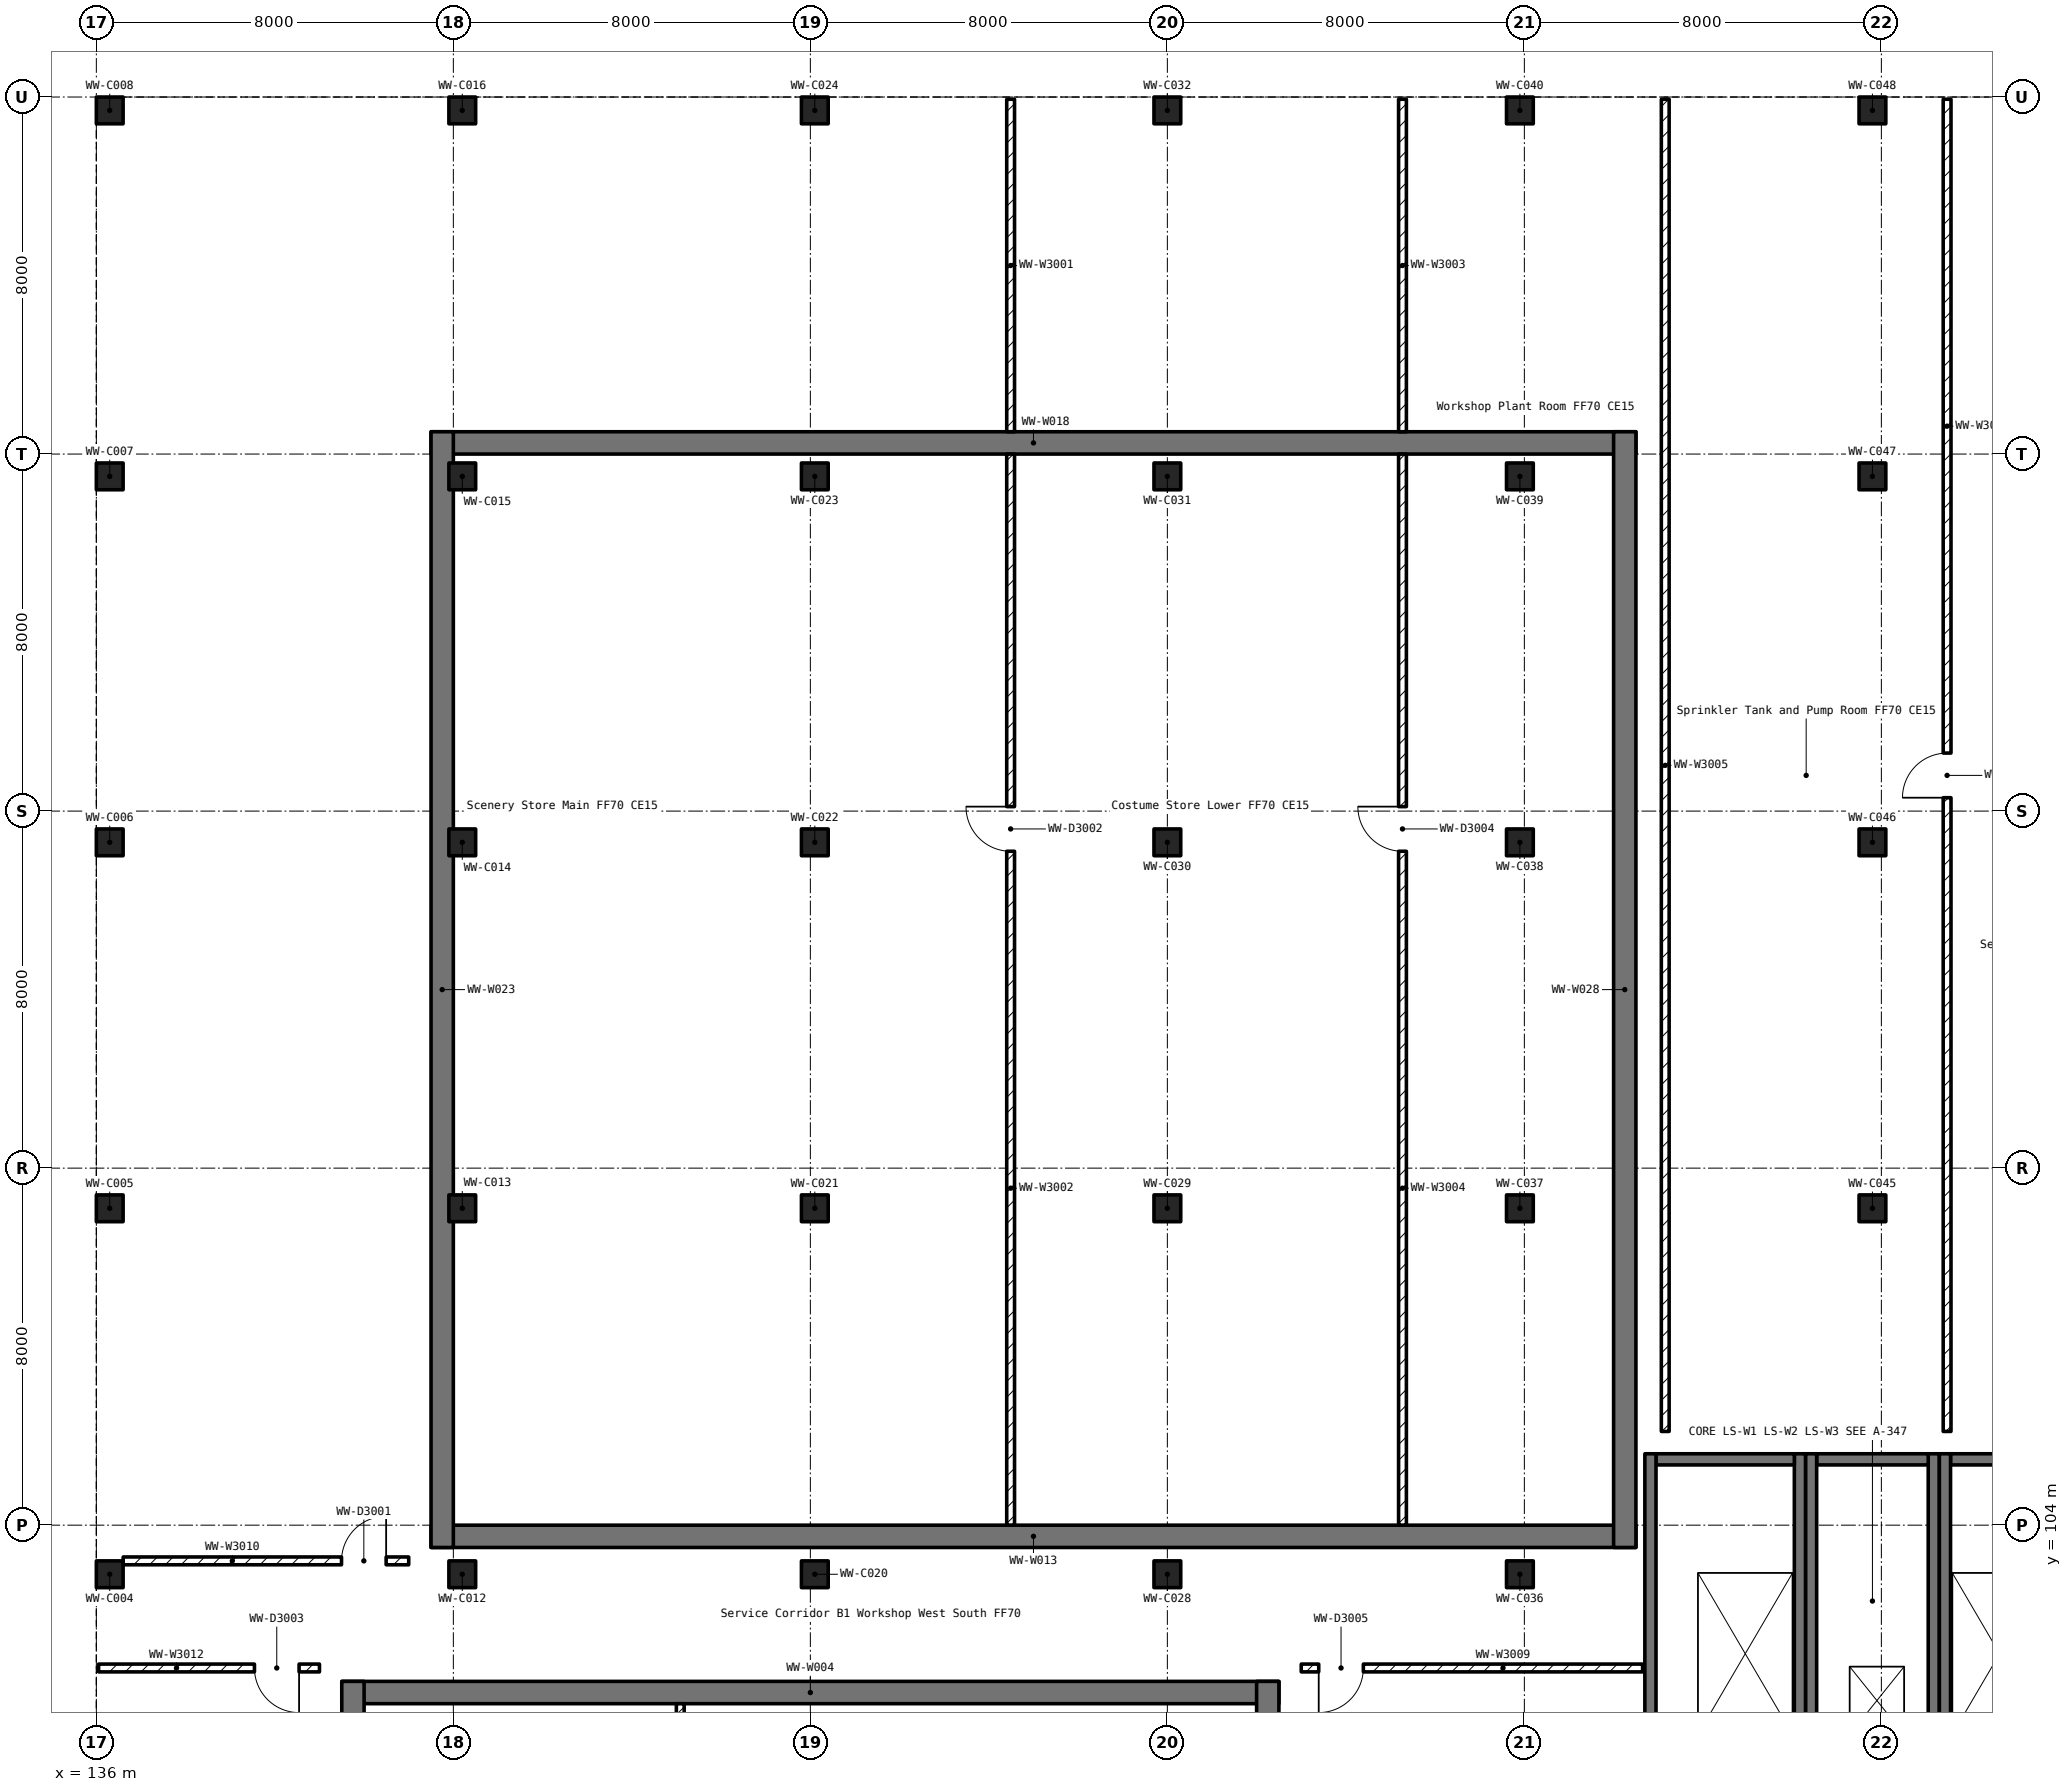
"""IFC4 building model, lengths in metres.
Left out: names, types, materials, properties, quantities, classifications, styles, units other than length and angle.
Written with IfcOpenShell. Run it as: python <this file> out.ifc"""

import sys

from ifc_helpers import new_model, si_unit, direction, frame, frame_2d, origin, origin_2d, place, context, subcontext, project, spatial, rectangle, extrude, element, fill, save


model = new_model("IFC4")
c1 = context("Model", 3, precision=1e-05, world=origin(), true_north=direction((0.0, 1.0)))
c2 = subcontext(c1, "Body", "Model", "MODEL_VIEW")
j1 = project(units=[si_unit("LENGTHUNIT", "METRE"), si_unit("PLANEANGLEUNIT", "RADIAN")], contexts=[c1])
p1 = place(None, origin())
s1 = spatial("IfcSite", under=j1, at=p1, CompositionType="ELEMENT")
p2 = place(p1, origin())
s2 = spatial("IfcBuilding", under=s1, at=p2, CompositionType="ELEMENT")
p3 = place(p2, frame((0.0, 0.0, -6.0)))
s3 = spatial("IfcBuildingStorey", under=s2, at=p3, CompositionType="ELEMENT", Elevation=-6.0)
for number, where, z_axis, x_axis in (
    (1, (136.3, 102.9, 0.0), (0.0, 0.0, 1.0), (1.0, 0.0, 0.0)),
    (2, (136.3, 111.1, 0.0), (0.0, 0.0, 1.0), (1.0, 0.0, 0.0)),
    (3, (136.3, 119.3, 0.0), (0.0, 0.0, 1.0), (1.0, 0.0, 0.0)),
    (4, (136.3, 127.5, 0.0), (0.0, 0.0, 1.0), (1.0, 0.0, 0.0)),
    (5, (136.3, 135.7, 0.0), (0.0, 0.0, 1.0), (1.0, 0.0, 0.0)),
    (6, (144.2, 102.9, 0.0), (0.0, 0.0, 1.0), (1.0, 0.0, 0.0)),
    (7, (144.2, 111.1, 0.0), (0.0, 0.0, 1.0), (1.0, 0.0, 0.0)),
    (8, (144.2, 119.3, 0.0), (0.0, 0.0, 1.0), (1.0, 0.0, 0.0)),
    (9, (144.2, 127.5, 0.0), (0.0, 0.0, 1.0), (1.0, 0.0, 0.0)),
    (10, (144.2, 135.7, 0.0), (0.0, 0.0, 1.0), (1.0, 0.0, 0.0)),
    (11, (152.1, 102.9, 0.0), (0.0, 0.0, 1.0), (1.0, 0.0, 0.0)),
    (12, (152.1, 111.1, 0.0), (0.0, 0.0, 1.0), (1.0, 0.0, 0.0)),
    (13, (152.1, 119.3, 0.0), (0.0, 0.0, 1.0), (1.0, 0.0, 0.0)),
    (14, (152.1, 127.5, 0.0), (0.0, 0.0, 1.0), (1.0, 0.0, 0.0)),
    (15, (152.1, 135.7, 0.0), (0.0, 0.0, 1.0), (1.0, 0.0, 0.0)),
    (16, (160.0, 102.9, 0.0), (0.0, 0.0, 1.0), (1.0, 0.0, 0.0)),
    (17, (160.0, 111.1, 0.0), (0.0, 0.0, 1.0), (1.0, 0.0, 0.0)),
    (18, (160.0, 119.3, 0.0), (0.0, 0.0, 1.0), (1.0, 0.0, 0.0)),
    (19, (160.0, 127.5, 0.0), (0.0, 0.0, 1.0), (1.0, 0.0, 0.0)),
    (20, (160.0, 135.7, 0.0), (0.0, 0.0, 1.0), (1.0, 0.0, 0.0)),
    (21, (167.9, 102.9, 0.0), (0.0, 0.0, 1.0), (1.0, 0.0, 0.0)),
    (22, (167.9, 111.1, 0.0), (0.0, 0.0, 1.0), (1.0, 0.0, 0.0)),
    (23, (167.9, 119.3, 0.0), (0.0, 0.0, 1.0), (1.0, 0.0, 0.0)),
    (24, (167.9, 127.5, 0.0), (0.0, 0.0, 1.0), (1.0, 0.0, 0.0)),
    (25, (167.9, 135.7, 0.0), (0.0, 0.0, 1.0), (1.0, 0.0, 0.0)),
    (26, (175.8, 111.1, 0.0), (0.0, 0.0, 1.0), (1.0, 0.0, 0.0)),
    (27, (175.8, 119.3, 0.0), (0.0, 0.0, 1.0), (1.0, 0.0, 0.0)),
    (28, (175.8, 127.5, 0.0), (0.0, 0.0, 1.0), (1.0, 0.0, 0.0)),
    (29, (175.8, 135.7, 0.0), (0.0, 0.0, 1.0), (1.0, 0.0, 0.0)),
):
    element("IfcColumn", number, at=place(p3, frame(where, z_axis=z_axis, x_axis=x_axis)), inside=s3, PredefinedType="COLUMN", context=c2, shape_type="SweptSolid", body=[
        extrude(rectangle(XDim=0.6, YDim=0.6, at=origin_2d()), origin(), (0.0, 0.0, 1.0), 6.0),
    ])
p4 = place(p3, frame((141.5, 100.25, -0.3), z_axis=(0.0, 0.0, 1.0), x_axis=(1.0, 0.0, 0.0)))
e30 = element("IfcWall", 30, at=p4, inside=s3, PredefinedType="SHEAR", context=c2, shape_type="SweptSolid", body=[
    extrude(rectangle(XDim=21.0, YDim=0.5, at=frame_2d((10.5, 0.0))), origin(), (0.0, 0.0, 1.0), 6.3),
])
for number, where, z_axis, x_axis in (
    (31, (141.75, 81.5, -0.3), (0.0, 0.0, 1.0), (0.0, 1.0, 0.0)),
    (32, (162.25, 81.5, -0.3), (0.0, 0.0, 1.0), (0.0, 1.0, 0.0)),
):
    element("IfcWall", number, at=place(p3, frame(where, z_axis=z_axis, x_axis=x_axis)), inside=s3, PredefinedType="SHEAR", context=c2, shape_type="SweptSolid", body=[
        extrude(rectangle(XDim=19.0, YDim=0.5, at=frame_2d((9.5, 0.0))), origin(), (0.0, 0.0, 1.0), 6.3),
    ])
for number, where, z_axis, x_axis in (
    (33, (143.5, 103.75, -0.3), (0.0, 0.0, 1.0), (1.0, 0.0, 0.0)),
    (34, (143.5, 128.25, -0.3), (0.0, 0.0, 1.0), (1.0, 0.0, 0.0)),
):
    element("IfcWall", number, at=place(p3, frame(where, z_axis=z_axis, x_axis=x_axis)), inside=s3, PredefinedType="SHEAR", context=c2, shape_type="SweptSolid", body=[
        extrude(rectangle(XDim=27.0, YDim=0.5, at=frame_2d((13.5, 0.0))), origin(), (0.0, 0.0, 1.0), 6.3),
    ])
for number, where, z_axis, x_axis in (
    (35, (143.75, 103.5, -0.3), (0.0, 0.0, 1.0), (0.0, 1.0, 0.0)),
    (36, (170.25, 103.5, -0.3), (0.0, 0.0, 1.0), (0.0, 1.0, 0.0)),
):
    element("IfcWall", number, at=place(p3, frame(where, z_axis=z_axis, x_axis=x_axis)), inside=s3, PredefinedType="SHEAR", context=c2, shape_type="SweptSolid", body=[
        extrude(rectangle(XDim=25.0, YDim=0.5, at=frame_2d((12.5, 0.0))), origin(), (0.0, 0.0, 1.0), 6.3),
    ])
p5 = place(p3, frame((177.175, 99.0, 0.0), z_axis=(0.0, 0.0, 1.0), x_axis=(0.0, 1.0, 0.0)))
e37 = element("IfcWall", 37, at=p5, inside=s3, PredefinedType="SOLIDWALL", context=c2, shape_type="SweptSolid", body=[
    extrude(rectangle(XDim=6.6, YDim=0.25, at=frame_2d((3.3, 0.0))), origin(), (0.0, 0.0, 1.0), 6.0),
])
p6 = place(p3, frame((177.05, 105.475, 0.0), z_axis=(0.0, 0.0, 1.0), x_axis=(-1.0, 0.0, 0.0)))
e38 = element("IfcWall", 38, at=p6, inside=s3, PredefinedType="SOLIDWALL", context=c2, shape_type="SweptSolid", body=[
    extrude(rectangle(XDim=2.5, YDim=0.25, at=frame_2d((1.25, 0.0))), origin(), (0.0, 0.0, 1.0), 6.0),
])
for number, where, z_axis, x_axis in (
    (39, (174.425, 105.6, 0.0), (0.0, 0.0, 1.0), (0.0, -1.0, 0.0)),
    (40, (174.175, 99.0, 0.0), (0.0, 0.0, 1.0), (0.0, 1.0, 0.0)),
):
    element("IfcWall", number, at=place(p3, frame(where, z_axis=z_axis, x_axis=x_axis)), inside=s3, PredefinedType="SOLIDWALL", context=c2, shape_type="SweptSolid", body=[
        extrude(rectangle(XDim=6.6, YDim=0.25, at=frame_2d((3.3, 0.0))), origin(), (0.0, 0.0, 1.0), 6.0),
    ])
p7 = place(p3, frame((174.05, 105.475, 0.0), z_axis=(0.0, 0.0, 1.0), x_axis=(-1.0, 0.0, 0.0)))
e41 = element("IfcWall", 41, at=p7, inside=s3, PredefinedType="SOLIDWALL", context=c2, shape_type="SweptSolid", body=[
    extrude(rectangle(XDim=3.1, YDim=0.25, at=frame_2d((1.55, 0.0))), origin(), (0.0, 0.0, 1.0), 6.0),
])
p8 = place(p3, frame((170.825, 105.6, 0.0), z_axis=(0.0, 0.0, 1.0), x_axis=(0.0, -1.0, 0.0)))
e42 = element("IfcWall", 42, at=p8, inside=s3, PredefinedType="SOLIDWALL", context=c2, shape_type="SweptSolid", body=[
    extrude(rectangle(XDim=6.6, YDim=0.25, at=frame_2d((3.3, 0.0))), origin(), (0.0, 0.0, 1.0), 6.0),
])
p9 = place(p3, frame((180.65, 105.475, 0.0), z_axis=(0.0, 0.0, 1.0), x_axis=(-1.0, 0.0, 0.0)))
e43 = element("IfcWall", 43, at=p9, inside=s3, PredefinedType="SOLIDWALL", context=c2, shape_type="SweptSolid", body=[
    extrude(rectangle(XDim=3.1, YDim=0.25, at=frame_2d((1.55, 0.0))), origin(), (0.0, 0.0, 1.0), 6.0),
])
p10 = place(p3, frame((177.425, 105.6, 0.0), z_axis=(0.0, 0.0, 1.0), x_axis=(0.0, -1.0, 0.0)))
e44 = element("IfcWall", 44, at=p10, inside=s3, PredefinedType="SOLIDWALL", context=c2, shape_type="SweptSolid", body=[
    extrude(rectangle(XDim=6.6, YDim=0.25, at=frame_2d((3.3, 0.0))), origin(), (0.0, 0.0, 1.0), 6.0),
])
p11 = place(p3, frame((156.488, 128.5, 0.0), z_axis=(0.0, 0.0, 1.0), x_axis=(0.0, 1.0, 0.0)))
e45 = element("IfcWall", 45, at=p11, inside=s3, PredefinedType="PARTITIONING", context=c2, shape_type="SweptSolid", body=[
    extrude(rectangle(XDim=7.45, YDim=0.175, at=frame_2d((3.725, 0.0))), origin(), (0.0, 0.0, 1.0), 4.95),
])
p12 = place(p3, frame((156.488, 104.001, 0.0), z_axis=(0.0, 0.0, 1.0), x_axis=(0.0, 1.0, 0.0)))
e46 = element("IfcWall", 46, at=p12, inside=s3, PredefinedType="PARTITIONING", context=c2, shape_type="SweptSolid", body=[
    extrude(rectangle(XDim=23.998, YDim=0.175, at=frame_2d((11.999, 0.0))), origin(), (0.0, 0.0, 1.0), 4.95),
])
p13 = place(p12, frame((15.099, 0.0, 0.0)))
e47 = element("IfcOpeningElement", 47, at=p13, cuts=e46, PredefinedType="OPENING", context=c2, shape_type="SweptSolid", body=[
    extrude(rectangle(XDim=1.0, YDim=2.1, at=frame_2d((0.5, 1.05))), frame((0.0, 0.1, 0.0), z_axis=(0.0, -1.0, 0.0), x_axis=(1.0, 0.0, 0.0)), (0.0, 0.0, 1.0), 0.199),
])
p14 = place(p3, frame((165.269, 128.5, 0.0), z_axis=(0.0, 0.0, 1.0), x_axis=(0.0, 1.0, 0.0)))
e48 = element("IfcWall", 48, at=p14, inside=s3, PredefinedType="PARTITIONING", context=c2, shape_type="SweptSolid", body=[
    extrude(rectangle(XDim=7.45, YDim=0.175, at=frame_2d((3.725, 0.0))), origin(), (0.0, 0.0, 1.0), 4.95),
])
p15 = place(p3, frame((165.269, 104.001, 0.0), z_axis=(0.0, 0.0, 1.0), x_axis=(0.0, 1.0, 0.0)))
e49 = element("IfcWall", 49, at=p15, inside=s3, PredefinedType="PARTITIONING", context=c2, shape_type="SweptSolid", body=[
    extrude(rectangle(XDim=23.998, YDim=0.175, at=frame_2d((11.999, 0.0))), origin(), (0.0, 0.0, 1.0), 4.95),
])
p16 = place(p15, frame((15.099, 0.0, 0.0)))
e50 = element("IfcOpeningElement", 50, at=p16, cuts=e49, PredefinedType="OPENING", context=c2, shape_type="SweptSolid", body=[
    extrude(rectangle(XDim=1.0, YDim=2.1, at=frame_2d((0.5, 1.05))), frame((0.0, 0.1, 0.0), z_axis=(0.0, -1.0, 0.0), x_axis=(1.0, 0.0, 0.0)), (0.0, 0.0, 1.0), 0.199),
])
p17 = place(p3, frame((171.157, 106.1, 0.0), z_axis=(0.0, 0.0, 1.0), x_axis=(0.0, 1.0, 0.0)))
e51 = element("IfcWall", 51, at=p17, inside=s3, PredefinedType="PARTITIONING", context=c2, shape_type="SweptSolid", body=[
    extrude(rectangle(XDim=29.85, YDim=0.175, at=frame_2d((14.925, 0.0))), origin(), (0.0, 0.0, 1.0), 4.95),
])
p18 = place(p3, frame((177.473, 106.1, 0.0), z_axis=(0.0, 0.0, 1.0), x_axis=(0.0, 1.0, 0.0)))
e52 = element("IfcWall", 52, at=p18, inside=s3, PredefinedType="PARTITIONING", context=c2, shape_type="SweptSolid", body=[
    extrude(rectangle(XDim=29.85, YDim=0.175, at=frame_2d((14.925, 0.0))), origin(), (0.0, 0.0, 1.0), 4.95),
])
p19 = place(p18, frame((14.2, 0.0, 0.0)))
e53 = element("IfcOpeningElement", 53, at=p19, cuts=e52, PredefinedType="OPENING", context=c2, shape_type="SweptSolid", body=[
    extrude(rectangle(XDim=1.0, YDim=2.1, at=frame_2d((0.5, 1.05))), frame((0.0, 0.1, 0.0), z_axis=(0.0, -1.0, 0.0), x_axis=(1.0, 0.0, 0.0)), (0.0, 0.0, 1.0), 0.199),
])
p20 = place(p3, frame((149.085, 82.001, 0.0), z_axis=(0.0, 0.0, 1.0), x_axis=(0.0, 1.0, 0.0)))
e54 = element("IfcWall", 54, at=p20, inside=s3, PredefinedType="PARTITIONING", context=c2, shape_type="SweptSolid", body=[
    extrude(rectangle(XDim=17.998, YDim=0.175, at=frame_2d((8.999, 0.0))), origin(), (0.0, 0.0, 1.0), 4.95),
])
p21 = place(p3, frame((170.65, 100.8, 0.0), z_axis=(0.0, 0.0, 1.0), x_axis=(-1.0, 0.0, 0.0)))
e55 = element("IfcWall", 55, at=p21, inside=s3, PredefinedType="PARTITIONING", context=c2, shape_type="SweptSolid", body=[
    extrude(rectangle(XDim=7.65, YDim=0.175, at=frame_2d((3.825, 0.0))), origin(), (0.0, 0.0, 1.0), 4.95),
])
p22 = place(p21, frame((6.258, 0.0, 0.0)))
e56 = element("IfcOpeningElement", 56, at=p22, cuts=e55, PredefinedType="OPENING", context=c2, shape_type="SweptSolid", body=[
    extrude(rectangle(XDim=1.0, YDim=2.1, at=frame_2d((0.5, 1.05))), frame((0.0, 0.1, 0.0), z_axis=(0.0, -1.0, 0.0), x_axis=(1.0, 0.0, 0.0)), (0.0, 0.0, 1.0), 0.199),
])
p23 = place(p3, frame((136.601, 103.2, 0.0), z_axis=(0.0, 0.0, 1.0), x_axis=(1.0, 0.0, 0.0)))
e57 = element("IfcWall", 57, at=p23, inside=s3, PredefinedType="PARTITIONING", context=c2, shape_type="SweptSolid", body=[
    extrude(rectangle(XDim=6.399, YDim=0.175, at=frame_2d((3.199, 0.0))), origin(), (0.0, 0.0, 1.0), 4.95),
])
p24 = place(p23, frame((4.893, 0.0, 0.0)))
e58 = element("IfcOpeningElement", 58, at=p24, cuts=e57, PredefinedType="OPENING", context=c2, shape_type="SweptSolid", body=[
    extrude(rectangle(XDim=1.0, YDim=2.1, at=frame_2d((0.5, 1.05))), frame((0.0, 0.1, 0.0), z_axis=(0.0, -1.0, 0.0), x_axis=(1.0, 0.0, 0.0)), (0.0, 0.0, 1.0), 0.199),
])
p25 = place(p3, frame((141.0, 100.8, 0.0), z_axis=(0.0, 0.0, 1.0), x_axis=(-1.0, 0.0, 0.0)))
e59 = element("IfcWall", 59, at=p25, inside=s3, PredefinedType="PARTITIONING", context=c2, shape_type="SweptSolid", body=[
    extrude(rectangle(XDim=4.95, YDim=0.175, at=frame_2d((2.475, 0.0))), origin(), (0.0, 0.0, 1.0), 4.95),
])
p26 = place(p25, frame((0.457, 0.0, 0.0)))
e60 = element("IfcOpeningElement", 60, at=p26, cuts=e59, PredefinedType="OPENING", context=c2, shape_type="SweptSolid", body=[
    extrude(rectangle(XDim=1.0, YDim=2.1, at=frame_2d((0.5, 1.05))), frame((0.0, 0.1, 0.0), z_axis=(0.0, -1.0, 0.0), x_axis=(1.0, 0.0, 0.0)), (0.0, 0.0, 1.0), 0.199),
])
p27 = place(p24, origin())
e61 = element("IfcDoor", 61, at=p27, inside=s3, OperationType="SINGLE_SWING_RIGHT", PredefinedType="DOOR", context=c2, shape_type="SweptSolid", body=[
    extrude(rectangle(XDim=1.0, YDim=2.1, at=frame_2d((0.5, 1.05))), frame((0.0, 0.025, 0.0), z_axis=(0.0, -1.0, 0.0), x_axis=(1.0, 0.0, 0.0)), (0.0, 0.0, 1.0), 0.05),
])
fill(e58, e61)
p28 = place(p13, origin())
e62 = element("IfcDoor", 62, at=p28, inside=s3, OperationType="SINGLE_SWING_RIGHT", PredefinedType="DOOR", context=c2, shape_type="SweptSolid", body=[
    extrude(rectangle(XDim=1.0, YDim=2.1, at=frame_2d((0.5, 1.05))), frame((0.0, 0.025, 0.0), z_axis=(0.0, -1.0, 0.0), x_axis=(1.0, 0.0, 0.0)), (0.0, 0.0, 1.0), 0.05),
])
fill(e47, e62)
p29 = place(p26, origin())
e63 = element("IfcDoor", 63, at=p29, inside=s3, OperationType="SINGLE_SWING_LEFT", PredefinedType="DOOR", context=c2, shape_type="SweptSolid", body=[
    extrude(rectangle(XDim=1.0, YDim=2.1, at=frame_2d((0.5, 1.05))), frame((0.0, 0.025, 0.0), z_axis=(0.0, -1.0, 0.0), x_axis=(1.0, 0.0, 0.0)), (0.0, 0.0, 1.0), 0.05),
])
fill(e60, e63)
p30 = place(p16, origin())
e64 = element("IfcDoor", 64, at=p30, inside=s3, OperationType="SINGLE_SWING_RIGHT", PredefinedType="DOOR", context=c2, shape_type="SweptSolid", body=[
    extrude(rectangle(XDim=1.0, YDim=2.1, at=frame_2d((0.5, 1.05))), frame((0.0, 0.025, 0.0), z_axis=(0.0, -1.0, 0.0), x_axis=(1.0, 0.0, 0.0)), (0.0, 0.0, 1.0), 0.05),
])
fill(e50, e64)
p31 = place(p22, origin())
e65 = element("IfcDoor", 65, at=p31, inside=s3, OperationType="SINGLE_SWING_RIGHT", PredefinedType="DOOR", context=c2, shape_type="SweptSolid", body=[
    extrude(rectangle(XDim=1.0, YDim=2.1, at=frame_2d((0.5, 1.05))), frame((0.0, 0.025, 0.0), z_axis=(0.0, -1.0, 0.0), x_axis=(1.0, 0.0, 0.0)), (0.0, 0.0, 1.0), 0.05),
])
fill(e56, e65)
p32 = place(p19, origin())
e66 = element("IfcDoor", 66, at=p32, inside=s3, OperationType="SINGLE_SWING_LEFT", PredefinedType="DOOR", context=c2, shape_type="SweptSolid", body=[
    extrude(rectangle(XDim=1.0, YDim=2.1, at=frame_2d((0.5, 1.05))), frame((0.0, 0.025, 0.0), z_axis=(0.0, -1.0, 0.0), x_axis=(1.0, 0.0, 0.0)), (0.0, 0.0, 1.0), 0.05),
])
fill(e53, e66)
save(model, sys.argv[1])
